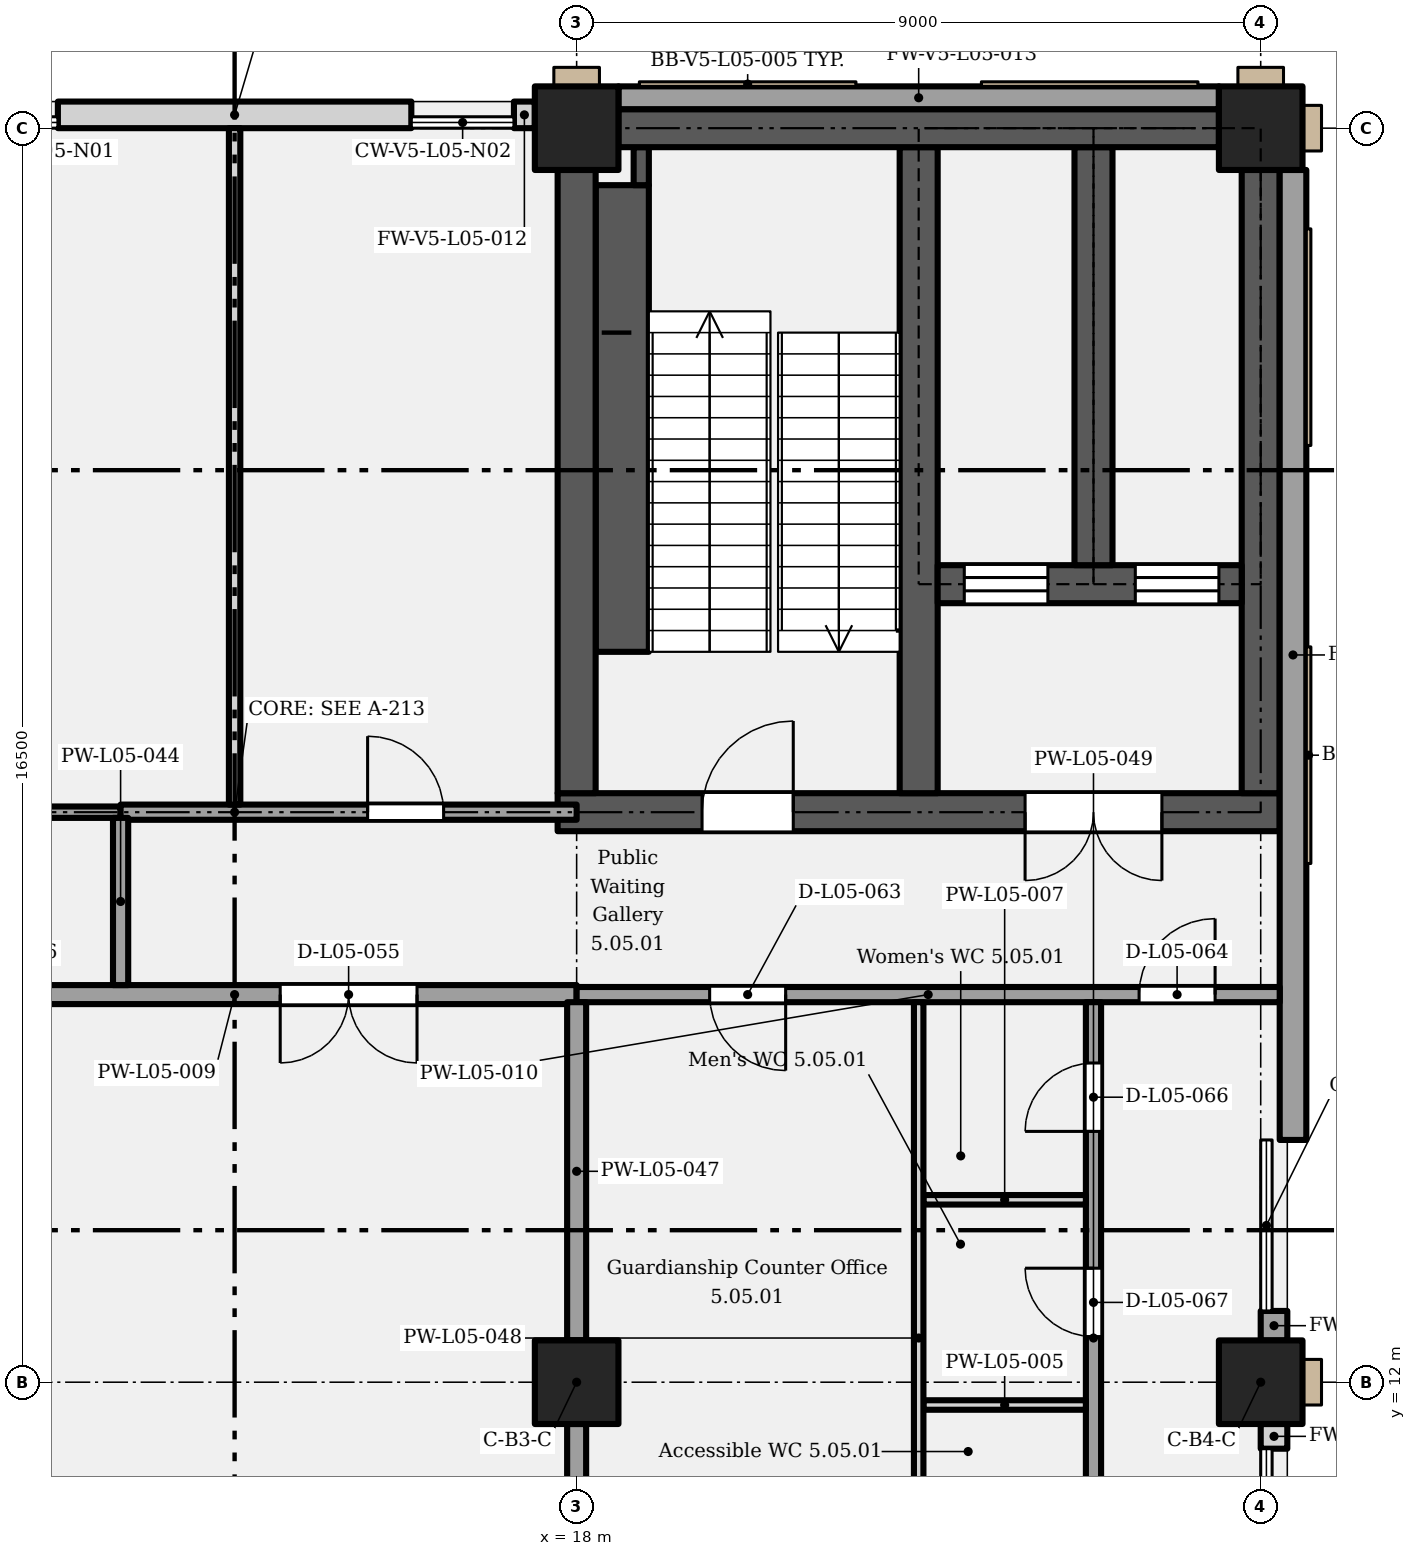
"""IFC4 building model, lengths in metres.
Left out: names, types, materials, properties, quantities, classifications, styles, units other than length and angle.
Written with IfcOpenShell. Run it as: python <this file> out.ifc"""

import sys

from ifc_helpers import new_model, si_unit, direction, frame, frame_2d, origin, origin_2d, place, context, subcontext, project, spatial, rectangle, extrude, element, fill, save


model = new_model("IFC4")
c1 = context("Model", 3, precision=1e-05, world=origin(), true_north=direction((0.0, 1.0)))
c2 = subcontext(c1, "Body", "Model", "MODEL_VIEW")
j1 = project(units=[si_unit("LENGTHUNIT", "METRE"), si_unit("PLANEANGLEUNIT", "RADIAN")], contexts=[c1])
p1 = place(None, origin())
s1 = spatial("IfcSite", under=j1, at=p1, CompositionType="ELEMENT")
p2 = place(p1, origin())
s2 = spatial("IfcBuilding", under=s1, at=p2, CompositionType="ELEMENT")
p3 = place(p2, frame((0.0, 0.0, 28.2)))
s3 = spatial("IfcBuildingStorey", under=s2, at=p3, CompositionType="ELEMENT", Elevation=28.2)
for number, where, z_axis, x_axis in (
    (1, (18.0, 12.0, 0.0), (0.0, 0.0, 1.0), (1.0, 0.0, 0.0)),
    (2, (27.0, 12.0, 0.0), (0.0, 0.0, 1.0), (1.0, 0.0, 0.0)),
    (3, (18.0, 28.5, 0.0), (0.0, 0.0, 1.0), (1.0, 0.0, 0.0)),
    (4, (27.0, 28.5, 0.0), (0.0, 0.0, 1.0), (1.0, 0.0, 0.0)),
):
    element("IfcColumn", number, at=place(p3, frame(where, z_axis=z_axis, x_axis=x_axis)), inside=s3, PredefinedType="COLUMN", context=c2, shape_type="SweptSolid", body=[
        extrude(rectangle(XDim=1.1, YDim=1.1, at=origin_2d()), origin(), (0.0, 0.0, 1.0), 5.4),
    ])
p4 = place(p3, frame((17.75, 19.5, 0.0), z_axis=(0.0, 0.0, 1.0), x_axis=(1.0, 0.0, 0.0)))
e5 = element("IfcWall", 5, at=p4, inside=s3, PredefinedType="SHEAR", context=c2, shape_type="SweptSolid", body=[
    extrude(rectangle(XDim=9.5, YDim=0.5, at=frame_2d((4.75, 0.0))), origin(), (0.0, 0.0, 1.0), 5.15),
])
p5 = place(p4, frame((1.9, 0.0, 0.0)))
e6 = element("IfcOpeningElement", 6, at=p5, cuts=e5, PredefinedType="OPENING", context=c2, shape_type="SweptSolid", body=[
    extrude(rectangle(XDim=1.2, YDim=2.1, at=frame_2d((0.6, 1.05))), frame((0.0, 0.26, 0.0), z_axis=(0.0, -1.0, 0.0), x_axis=(1.0, 0.0, 0.0)), (0.0, 0.0, 1.0), 0.52),
])
p6 = place(p4, frame((7.95, 0.0, 0.0), z_axis=(0.0, 0.0, 1.0), x_axis=(-1.0, 0.0, 0.0)))
e7 = element("IfcOpeningElement", 7, at=p6, cuts=e5, PredefinedType="OPENING", context=c2, shape_type="SweptSolid", body=[
    extrude(rectangle(XDim=1.8, YDim=2.1, at=frame_2d((0.9, 1.05))), frame((0.0, 0.26, 0.0), z_axis=(0.0, -1.0, 0.0), x_axis=(1.0, 0.0, 0.0)), (0.0, 0.0, 1.0), 0.52),
])
p7 = place(p3, frame((18.0, 19.75, 0.0), z_axis=(0.0, 0.0, 1.0), x_axis=(0.0, 1.0, 0.0)))
e8 = element("IfcWall", 8, at=p7, inside=s3, PredefinedType="SHEAR", context=c2, shape_type="SweptSolid", body=[
    extrude(rectangle(XDim=8.2, YDim=0.5, at=frame_2d((4.1, 0.0))), origin(), (0.0, 0.0, 1.0), 5.15),
])
p8 = place(p3, frame((22.5, 19.75, 0.0), z_axis=(0.0, 0.0, 1.0), x_axis=(0.0, 1.0, 0.0)))
e9 = element("IfcWall", 9, at=p8, inside=s3, PredefinedType="SHEAR", context=c2, shape_type="SweptSolid", body=[
    extrude(rectangle(XDim=8.5, YDim=0.5, at=frame_2d((4.25, 0.0))), origin(), (0.0, 0.0, 1.0), 5.15),
])
p9 = place(p3, frame((27.0, 19.75, 0.0), z_axis=(0.0, 0.0, 1.0), x_axis=(0.0, 1.0, 0.0)))
e10 = element("IfcWall", 10, at=p9, inside=s3, PredefinedType="SHEAR", context=c2, shape_type="SweptSolid", body=[
    extrude(rectangle(XDim=8.2, YDim=0.5, at=frame_2d((4.1, 0.0))), origin(), (0.0, 0.0, 1.0), 5.15),
])
p10 = place(p3, frame((22.75, 22.5, 0.0), z_axis=(0.0, 0.0, 1.0), x_axis=(1.0, 0.0, 0.0)))
e11 = element("IfcWall", 11, at=p10, inside=s3, PredefinedType="SHEAR", context=c2, shape_type="SweptSolid", body=[
    extrude(rectangle(XDim=4.0, YDim=0.5, at=frame_2d((2.0, 0.0))), origin(), (0.0, 0.0, 1.0), 5.15),
])
p11 = place(p10, frame((0.35, 0.0, 0.0)))
e12 = element("IfcOpeningElement", 12, at=p11, cuts=e11, PredefinedType="OPENING", context=c2, shape_type="SweptSolid", body=[
    extrude(rectangle(XDim=1.1, YDim=2.1, at=frame_2d((0.55, 1.05))), frame((0.0, 0.26, 0.0), z_axis=(0.0, -1.0, 0.0), x_axis=(1.0, 0.0, 0.0)), (0.0, 0.0, 1.0), 0.52),
])
p12 = place(p10, frame((2.6, 0.0, 0.0)))
e13 = element("IfcOpeningElement", 13, at=p12, cuts=e11, PredefinedType="OPENING", context=c2, shape_type="SweptSolid", body=[
    extrude(rectangle(XDim=1.1, YDim=2.1, at=frame_2d((0.55, 1.05))), frame((0.0, 0.26, 0.0), z_axis=(0.0, -1.0, 0.0), x_axis=(1.0, 0.0, 0.0)), (0.0, 0.0, 1.0), 0.52),
])
p13 = place(p3, frame((24.8, 22.75, 0.0), z_axis=(0.0, 0.0, 1.0), x_axis=(0.0, 1.0, 0.0)))
e14 = element("IfcWall", 14, at=p13, inside=s3, PredefinedType="SHEAR", context=c2, shape_type="SweptSolid", body=[
    extrude(rectangle(XDim=5.5, YDim=0.5, at=frame_2d((2.75, 0.0))), origin(), (0.0, 0.0, 1.0), 5.15),
])
p14 = place(p3, frame((18.55, 28.5, 0.0), z_axis=(0.0, 0.0, 1.0), x_axis=(1.0, 0.0, 0.0)))
e15 = element("IfcWall", 15, at=p14, inside=s3, PredefinedType="SHEAR", context=c2, shape_type="SweptSolid", body=[
    extrude(rectangle(XDim=7.9, YDim=0.5, at=frame_2d((3.95, 0.0))), origin(), (0.0, 0.0, 1.0), 5.15),
])
p15 = place(p3, frame((11.175, 28.675, 0.0), z_axis=(0.0, 0.0, 1.0), x_axis=(1.0, 0.0, 0.0)))
e16 = element("IfcWall", 16, at=p15, inside=s3, PredefinedType="SOLIDWALL", context=c2, shape_type="SweptSolid", body=[
    extrude(rectangle(XDim=4.65, YDim=0.35, at=frame_2d((2.325, 0.0))), origin(), (0.0, 0.0, 1.0), 5.15),
])
p16 = place(p3, frame((17.175, 28.675, 0.0), z_axis=(0.0, 0.0, 1.0), x_axis=(1.0, 0.0, 0.0)))
e17 = element("IfcWall", 17, at=p16, inside=s3, PredefinedType="SOLIDWALL", context=c2, shape_type="SweptSolid", body=[
    extrude(rectangle(XDim=0.275, YDim=0.35, at=frame_2d((0.137, 0.0))), origin(), (0.0, 0.0, 1.0), 5.15),
])
p17 = place(p3, frame((18.55, 28.9, 0.0), z_axis=(0.0, 0.0, 1.0), x_axis=(1.0, 0.0, 0.0)))
e18 = element("IfcWall", 18, at=p17, inside=s3, PredefinedType="SOLIDWALL", context=c2, shape_type="SweptSolid", body=[
    extrude(rectangle(XDim=7.9, YDim=0.3, at=frame_2d((3.95, 0.0))), origin(), (0.0, 0.0, 1.0), 5.15),
])
p18 = place(p3, frame((27.175, 11.125, 0.0), z_axis=(0.0, 0.0, 1.0), x_axis=(0.0, 1.0, 0.0)))
e19 = element("IfcWall", 19, at=p18, inside=s3, PredefinedType="SOLIDWALL", context=c2, shape_type="SweptSolid", body=[
    extrude(rectangle(XDim=0.325, YDim=0.35, at=frame_2d((0.163, 0.0))), origin(), (0.0, 0.0, 1.0), 5.15),
])
p19 = place(p3, frame((27.175, 12.55, 0.0), z_axis=(0.0, 0.0, 1.0), x_axis=(0.0, 1.0, 0.0)))
e20 = element("IfcWall", 20, at=p19, inside=s3, PredefinedType="SOLIDWALL", context=c2, shape_type="SweptSolid", body=[
    extrude(rectangle(XDim=0.387, YDim=0.35, at=frame_2d((0.194, 0.0))), origin(), (0.0, 0.0, 1.0), 5.15),
])
p20 = place(p3, frame((27.425, 15.188, 0.0), z_axis=(0.0, 0.0, 1.0), x_axis=(0.0, 1.0, 0.0)))
e21 = element("IfcWall", 21, at=p20, inside=s3, PredefinedType="SOLIDWALL", context=c2, shape_type="SweptSolid", body=[
    extrude(rectangle(XDim=12.762, YDim=0.35, at=frame_2d((6.381, 0.0))), origin(), (0.0, 0.0, 1.0), 5.15),
])
p21 = place(p3, frame((22.562, 11.7, 0.0), z_axis=(0.0, 0.0, 1.0), x_axis=(1.0, 0.0, 0.0)))
e22 = element("IfcWall", 22, at=p21, inside=s3, PredefinedType="PARTITIONING", context=c2, shape_type="SweptSolid", body=[
    extrude(rectangle(XDim=2.137, YDim=0.125, at=frame_2d((1.069, 0.0))), origin(), (0.0, 0.0, 1.0), 4.4),
])
p22 = place(p3, frame((22.562, 14.4, 0.0), z_axis=(0.0, 0.0, 1.0), x_axis=(1.0, 0.0, 0.0)))
e23 = element("IfcWall", 23, at=p22, inside=s3, PredefinedType="PARTITIONING", context=c2, shape_type="SweptSolid", body=[
    extrude(rectangle(XDim=2.137, YDim=0.125, at=frame_2d((1.069, 0.0))), origin(), (0.0, 0.0, 1.0), 5.15),
])
p23 = place(p3, frame((9.0, 17.1, 0.0), z_axis=(0.0, 0.0, 1.0), x_axis=(1.0, 0.0, 0.0)))
e24 = element("IfcWall", 24, at=p23, inside=s3, PredefinedType="PARTITIONING", context=c2, shape_type="SweptSolid", body=[
    extrude(rectangle(XDim=9.0, YDim=0.25, at=frame_2d((4.5, 0.0))), origin(), (0.0, 0.0, 1.0), 5.15),
])
p24 = place(p23, frame((6.9, 0.0, 0.0), z_axis=(0.0, 0.0, 1.0), x_axis=(-1.0, 0.0, 0.0)))
e25 = element("IfcOpeningElement", 25, at=p24, cuts=e24, PredefinedType="OPENING", context=c2, shape_type="SweptSolid", body=[
    extrude(rectangle(XDim=1.8, YDim=2.4, at=frame_2d((0.9, 1.2))), frame((0.0, 0.135, 0.0), z_axis=(0.0, -1.0, 0.0), x_axis=(1.0, 0.0, 0.0)), (0.0, 0.0, 1.0), 0.27),
])
p25 = place(p23, frame((2.0, 0.0, 0.0), z_axis=(0.0, 0.0, 1.0), x_axis=(-1.0, 0.0, 0.0)))
e26 = element("IfcOpeningElement", 26, at=p25, cuts=e24, PredefinedType="OPENING", context=c2, shape_type="SweptSolid", body=[
    extrude(rectangle(XDim=1.0, YDim=2.1, at=frame_2d((0.5, 1.05))), frame((0.0, 0.135, 0.0), z_axis=(0.0, -1.0, 0.0), x_axis=(1.0, 0.0, 0.0)), (0.0, 0.0, 1.0), 0.27),
])
p26 = place(p3, frame((18.0, 17.1, 0.0), z_axis=(0.0, 0.0, 1.0), x_axis=(1.0, 0.0, 0.0)))
e27 = element("IfcWall", 27, at=p26, inside=s3, PredefinedType="PARTITIONING", context=c2, shape_type="SweptSolid", body=[
    extrude(rectangle(XDim=9.25, YDim=0.2, at=frame_2d((4.625, 0.0))), origin(), (0.0, 0.0, 1.0), 5.15),
])
p27 = place(p26, frame((2.75, 0.0, 0.0), z_axis=(0.0, 0.0, 1.0), x_axis=(-1.0, 0.0, 0.0)))
e28 = element("IfcOpeningElement", 28, at=p27, cuts=e27, PredefinedType="OPENING", context=c2, shape_type="SweptSolid", body=[
    extrude(rectangle(XDim=1.0, YDim=2.1, at=frame_2d((0.5, 1.05))), frame((0.0, 0.11, 0.0), z_axis=(0.0, -1.0, 0.0), x_axis=(1.0, 0.0, 0.0)), (0.0, 0.0, 1.0), 0.22),
])
p28 = place(p26, frame((7.4, 0.0, 0.0)))
e29 = element("IfcOpeningElement", 29, at=p28, cuts=e27, PredefinedType="OPENING", context=c2, shape_type="SweptSolid", body=[
    extrude(rectangle(XDim=1.0, YDim=2.1, at=frame_2d((0.5, 1.05))), frame((0.0, 0.11, 0.0), z_axis=(0.0, -1.0, 0.0), x_axis=(1.0, 0.0, 0.0)), (0.0, 0.0, 1.0), 0.22),
])
p29 = place(p3, frame((9.0, 19.5, 0.0), z_axis=(0.0, 0.0, 1.0), x_axis=(1.0, 0.0, 0.0)))
e30 = element("IfcWall", 30, at=p29, inside=s3, PredefinedType="PARTITIONING", context=c2, shape_type="SweptSolid", body=[
    extrude(rectangle(XDim=3.0, YDim=0.15, at=frame_2d((1.5, 0.0))), origin(), (0.0, 0.0, 1.0), 5.15),
])
p30 = place(p29, frame((1.0, 0.0, 0.0)))
e31 = element("IfcOpeningElement", 31, at=p30, cuts=e30, PredefinedType="OPENING", context=c2, shape_type="SweptSolid", body=[
    extrude(rectangle(XDim=1.0, YDim=2.1, at=frame_2d((0.5, 1.05))), frame((0.0, 0.085, 0.0), z_axis=(0.0, -1.0, 0.0), x_axis=(1.0, 0.0, 0.0)), (0.0, 0.0, 1.0), 0.17),
])
p31 = place(p3, frame((12.0, 19.5, 0.0), z_axis=(0.0, 0.0, 1.0), x_axis=(1.0, 0.0, 0.0)))
e32 = element("IfcWall", 32, at=p31, inside=s3, PredefinedType="PARTITIONING", context=c2, shape_type="SweptSolid", body=[
    extrude(rectangle(XDim=6.0, YDim=0.2, at=frame_2d((3.0, 0.0))), origin(), (0.0, 0.0, 1.0), 5.15),
])
p32 = place(p31, frame((3.25, 0.0, 0.0)))
e33 = element("IfcOpeningElement", 33, at=p32, cuts=e32, PredefinedType="OPENING", context=c2, shape_type="SweptSolid", body=[
    extrude(rectangle(XDim=1.0, YDim=2.1, at=frame_2d((0.5, 1.05))), frame((0.0, 0.11, 0.0), z_axis=(0.0, -1.0, 0.0), x_axis=(1.0, 0.0, 0.0)), (0.0, 0.0, 1.0), 0.22),
])
p33 = place(p3, frame((12.0, 17.225, 0.0), z_axis=(0.0, 0.0, 1.0), x_axis=(0.0, 1.0, 0.0)))
e34 = element("IfcWall", 34, at=p33, inside=s3, PredefinedType="PARTITIONING", context=c2, shape_type="SweptSolid", body=[
    extrude(rectangle(XDim=2.2, YDim=0.2, at=frame_2d((1.1, 0.0))), origin(), (0.0, 0.0, 1.0), 5.15),
])
p34 = place(p3, frame((13.5, 19.6, 0.0), z_axis=(0.0, 0.0, 1.0), x_axis=(0.0, 1.0, 0.0)))
e35 = element("IfcWall", 35, at=p34, inside=s3, PredefinedType="PARTITIONING", context=c2, shape_type="SweptSolid", body=[
    extrude(rectangle(XDim=8.9, YDim=0.15, at=frame_2d((4.45, 0.0))), origin(), (0.0, 0.0, 1.0), 5.15),
])
p35 = place(p3, frame((18.0, 0.55, 0.0), z_axis=(0.0, 0.0, 1.0), x_axis=(0.0, 1.0, 0.0)))
e36 = element("IfcWall", 36, at=p35, inside=s3, PredefinedType="PARTITIONING", context=c2, shape_type="SweptSolid", body=[
    extrude(rectangle(XDim=10.9, YDim=0.25, at=frame_2d((5.45, 0.0))), origin(), (0.0, 0.0, 1.0), 4.4),
])
p36 = place(p3, frame((18.0, 12.55, 0.0), z_axis=(0.0, 0.0, 1.0), x_axis=(0.0, 1.0, 0.0)))
e37 = element("IfcWall", 37, at=p36, inside=s3, PredefinedType="PARTITIONING", context=c2, shape_type="SweptSolid", body=[
    extrude(rectangle(XDim=4.45, YDim=0.25, at=frame_2d((2.225, 0.0))), origin(), (0.0, 0.0, 1.0), 4.2),
])
p37 = place(p3, frame((22.5, 8.163, 0.0), z_axis=(0.0, 0.0, 1.0), x_axis=(0.0, 1.0, 0.0)))
e38 = element("IfcWall", 38, at=p37, inside=s3, PredefinedType="PARTITIONING", context=c2, shape_type="SweptSolid", body=[
    extrude(rectangle(XDim=8.837, YDim=0.125, at=frame_2d((4.419, 0.0))), origin(), (0.0, 0.0, 1.0), 5.15),
])
p38 = place(p3, frame((24.8, 8.163, 0.0), z_axis=(0.0, 0.0, 1.0), x_axis=(0.0, 1.0, 0.0)))
e39 = element("IfcWall", 39, at=p38, inside=s3, PredefinedType="PARTITIONING", context=c2, shape_type="SweptSolid", body=[
    extrude(rectangle(XDim=8.837, YDim=0.2, at=frame_2d((4.419, 0.0))), origin(), (0.0, 0.0, 1.0), 5.15),
])
p39 = place(p38, frame((7.137, 0.0, 0.0)))
e40 = element("IfcOpeningElement", 40, at=p39, cuts=e39, PredefinedType="OPENING", context=c2, shape_type="SweptSolid", body=[
    extrude(rectangle(XDim=0.9, YDim=2.1, at=frame_2d((0.45, 1.05))), frame((0.0, 0.11, 0.0), z_axis=(0.0, -1.0, 0.0), x_axis=(1.0, 0.0, 0.0)), (0.0, 0.0, 1.0), 0.22),
])
p40 = place(p38, frame((4.438, 0.0, 0.0)))
e41 = element("IfcOpeningElement", 41, at=p40, cuts=e39, PredefinedType="OPENING", context=c2, shape_type="SweptSolid", body=[
    extrude(rectangle(XDim=0.9, YDim=2.1, at=frame_2d((0.45, 1.05))), frame((0.0, 0.11, 0.0), z_axis=(0.0, -1.0, 0.0), x_axis=(1.0, 0.0, 0.0)), (0.0, 0.0, 1.0), 0.22),
])
p41 = place(p38, frame((1.238, 0.0, 0.0)))
e42 = element("IfcOpeningElement", 42, at=p41, cuts=e39, PredefinedType="OPENING", context=c2, shape_type="SweptSolid", body=[
    extrude(rectangle(XDim=1.0, YDim=2.1, at=frame_2d((0.5, 1.05))), frame((0.0, 0.11, 0.0), z_axis=(0.0, -1.0, 0.0), x_axis=(1.0, 0.0, 0.0)), (0.0, 0.0, 1.0), 0.22),
])
p42 = place(p3, frame((18.6, 21.61, 0.0), z_axis=(0.0, 0.0, 1.0), x_axis=(0.0, 1.0, 0.0)))
e43 = element("IfcWall", 43, at=p42, inside=s3, PredefinedType="SHEAR", context=c2, shape_type="SweptSolid", body=[
    extrude(rectangle(XDim=6.14, YDim=0.7, at=frame_2d((3.07, 0.0))), origin(), (0.0, 0.0, 1.0), 2.587),
])
p43 = place(p3, frame((18.85, 27.75, 0.0), z_axis=(0.0, 0.0, 1.0), x_axis=(0.0, 1.0, 0.0)))
e44 = element("IfcWall", 44, at=p43, inside=s3, PredefinedType="SHEAR", context=c2, shape_type="SweptSolid", body=[
    extrude(rectangle(XDim=0.5, YDim=0.2, at=frame_2d((0.25, 0.0))), origin(), (0.0, 0.0, 1.0), 2.587),
])
p44 = place(p5, origin())
e45 = element("IfcDoor", 45, at=p44, inside=s3, OperationType="SINGLE_SWING_RIGHT", PredefinedType="DOOR", context=c2, shape_type="SweptSolid", body=[
    extrude(rectangle(XDim=1.2, YDim=2.1, at=frame_2d((0.6, 1.05))), frame((0.0, 0.025, 0.0), z_axis=(0.0, -1.0, 0.0), x_axis=(1.0, 0.0, 0.0)), (0.0, 0.0, 1.0), 0.05),
])
fill(e6, e45)
p45 = place(p6, origin())
e46 = element("IfcDoor", 46, at=p45, inside=s3, OperationType="DOUBLE_DOOR_SINGLE_SWING", PredefinedType="DOOR", context=c2, shape_type="SweptSolid", body=[
    extrude(rectangle(XDim=1.8, YDim=2.1, at=frame_2d((0.9, 1.05))), frame((0.0, 0.025, 0.0), z_axis=(0.0, -1.0, 0.0), x_axis=(1.0, 0.0, 0.0)), (0.0, 0.0, 1.0), 0.05),
])
fill(e7, e46)
p46 = place(p11, origin())
e47 = element("IfcDoor", 47, at=p46, inside=s3, OperationType="SLIDING_TO_LEFT", PredefinedType="DOOR", context=c2, shape_type="SweptSolid", body=[
    extrude(rectangle(XDim=1.1, YDim=2.1, at=frame_2d((0.55, 1.05))), frame((0.0, 0.025, 0.0), z_axis=(0.0, -1.0, 0.0), x_axis=(1.0, 0.0, 0.0)), (0.0, 0.0, 1.0), 0.05),
])
fill(e12, e47)
p47 = place(p12, origin())
e48 = element("IfcDoor", 48, at=p47, inside=s3, OperationType="SLIDING_TO_LEFT", PredefinedType="DOOR", context=c2, shape_type="SweptSolid", body=[
    extrude(rectangle(XDim=1.1, YDim=2.1, at=frame_2d((0.55, 1.05))), frame((0.0, 0.025, 0.0), z_axis=(0.0, -1.0, 0.0), x_axis=(1.0, 0.0, 0.0)), (0.0, 0.0, 1.0), 0.05),
])
fill(e13, e48)
p48 = place(p24, origin())
e49 = element("IfcDoor", 49, at=p48, inside=s3, OperationType="DOUBLE_DOOR_SINGLE_SWING", PredefinedType="DOOR", context=c2, shape_type="SweptSolid", body=[
    extrude(rectangle(XDim=1.8, YDim=2.4, at=frame_2d((0.9, 1.2))), frame((0.0, 0.025, 0.0), z_axis=(0.0, -1.0, 0.0), x_axis=(1.0, 0.0, 0.0)), (0.0, 0.0, 1.0), 0.05),
])
fill(e25, e49)
p49 = place(p32, origin())
e50 = element("IfcDoor", 50, at=p49, inside=s3, OperationType="SINGLE_SWING_LEFT", PredefinedType="DOOR", context=c2, shape_type="SweptSolid", body=[
    extrude(rectangle(XDim=1.0, YDim=2.1, at=frame_2d((0.5, 1.05))), frame((0.0, 0.025, 0.0), z_axis=(0.0, -1.0, 0.0), x_axis=(1.0, 0.0, 0.0)), (0.0, 0.0, 1.0), 0.05),
])
fill(e33, e50)
p50 = place(p27, origin())
e51 = element("IfcDoor", 51, at=p50, inside=s3, OperationType="SINGLE_SWING_LEFT", PredefinedType="DOOR", context=c2, shape_type="SweptSolid", body=[
    extrude(rectangle(XDim=1.0, YDim=2.1, at=frame_2d((0.5, 1.05))), frame((0.0, 0.025, 0.0), z_axis=(0.0, -1.0, 0.0), x_axis=(1.0, 0.0, 0.0)), (0.0, 0.0, 1.0), 0.05),
])
fill(e28, e51)
p51 = place(p28, origin())
e52 = element("IfcDoor", 52, at=p51, inside=s3, OperationType="SINGLE_SWING_RIGHT", PredefinedType="DOOR", context=c2, shape_type="SweptSolid", body=[
    extrude(rectangle(XDim=1.0, YDim=2.1, at=frame_2d((0.5, 1.05))), frame((0.0, 0.025, 0.0), z_axis=(0.0, -1.0, 0.0), x_axis=(1.0, 0.0, 0.0)), (0.0, 0.0, 1.0), 0.05),
])
fill(e29, e52)
p52 = place(p39, origin())
e53 = element("IfcDoor", 53, at=p52, inside=s3, OperationType="SINGLE_SWING_LEFT", PredefinedType="DOOR", context=c2, shape_type="SweptSolid", body=[
    extrude(rectangle(XDim=0.9, YDim=2.1, at=frame_2d((0.45, 1.05))), frame((0.0, 0.025, 0.0), z_axis=(0.0, -1.0, 0.0), x_axis=(1.0, 0.0, 0.0)), (0.0, 0.0, 1.0), 0.05),
])
fill(e40, e53)
p53 = place(p40, origin())
e54 = element("IfcDoor", 54, at=p53, inside=s3, OperationType="SINGLE_SWING_RIGHT", PredefinedType="DOOR", context=c2, shape_type="SweptSolid", body=[
    extrude(rectangle(XDim=0.9, YDim=2.1, at=frame_2d((0.45, 1.05))), frame((0.0, 0.025, 0.0), z_axis=(0.0, -1.0, 0.0), x_axis=(1.0, 0.0, 0.0)), (0.0, 0.0, 1.0), 0.05),
])
fill(e41, e54)
save(model, sys.argv[1])
